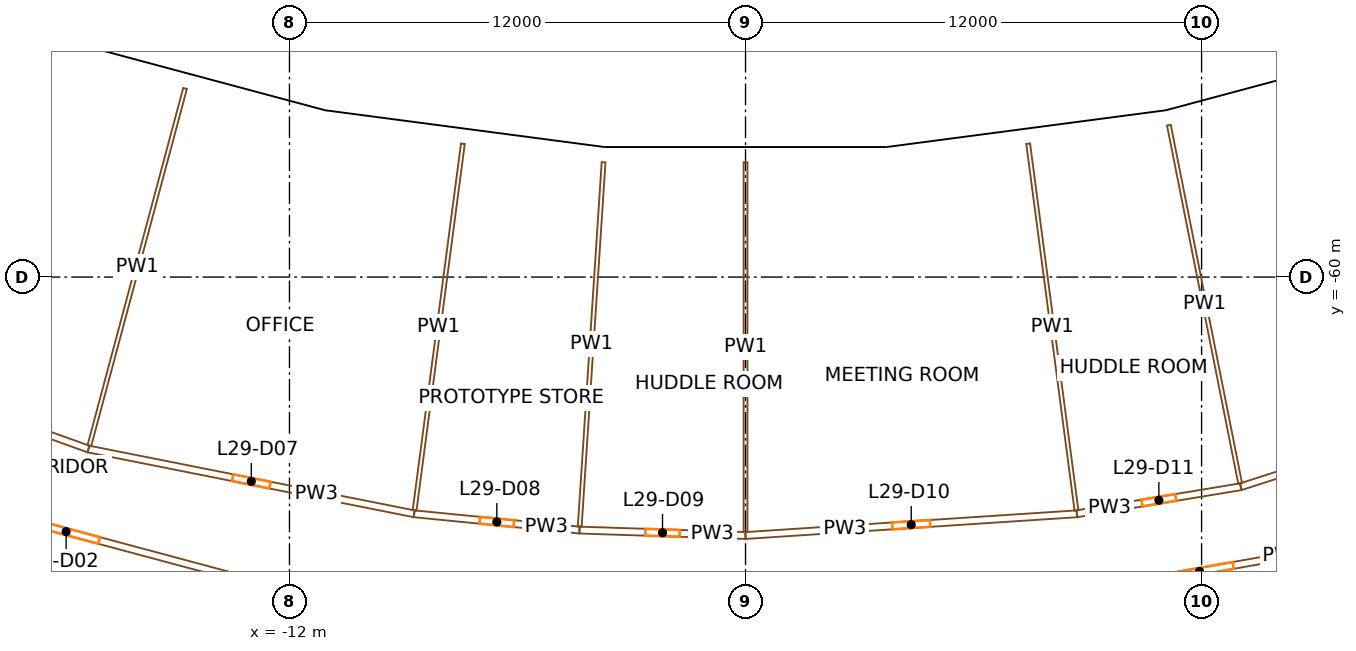
"""IFC4 building model, lengths in metres.
Left out: names, types, materials, properties, quantities, classifications, styles, units other than length and angle.
Written with IfcOpenShell. Run it as: python <this file> out.ifc"""

import sys

from ifc_helpers import new_model, si_unit, direction, frame, frame_2d, origin, origin_2d, place, context, subcontext, project, spatial, rectangle, extrude, element, fill, save


model = new_model("IFC4")
c1 = context("Model", 3, precision=1e-05, world=origin(), true_north=direction((0.0, 1.0)))
c2 = subcontext(c1, "Body", "Model", "MODEL_VIEW")
j1 = project(units=[si_unit("LENGTHUNIT", "METRE"), si_unit("PLANEANGLEUNIT", "RADIAN")], contexts=[c1])
p1 = place(None, origin())
s1 = spatial("IfcSite", under=j1, at=p1, CompositionType="ELEMENT")
p2 = place(p1, origin())
s2 = spatial("IfcBuilding", under=s1, at=p2, CompositionType="ELEMENT")
p3 = place(p2, frame((0.0, 0.0, 129.1)))
s3 = spatial("IfcBuildingStorey", under=s2, at=p3, CompositionType="ELEMENT", Elevation=129.1)
for number, where, z_axis, x_axis in (
    (1, (-18.724, -55.159, 0.0), (0.0, 0.0, 1.0), (0.947, -0.321, 0.0)),
    (2, (-11.364, -57.131, 0.0), (0.0, 0.0, 1.0), (0.981, -0.195, 0.0)),
    (3, (-3.81, -58.125, 0.0), (0.0, 0.0, 1.0), (0.998, -0.065, 0.0)),
    (4, (3.81, -58.125, 0.0), (0.0, 0.0, 1.0), (0.998, 0.065, 0.0)),
    (5, (11.364, -57.131, 0.0), (0.0, 0.0, 1.0), (0.981, 0.195, 0.0)),
):
    element("IfcColumn", number, at=place(p3, frame(where, z_axis=z_axis, x_axis=x_axis)), inside=s3, PredefinedType="COLUMN", context=c2, shape_type="SweptSolid", body=[
        extrude(rectangle(XDim=1.2, YDim=1.5, at=origin_2d()), origin(), (0.0, 0.0, 1.0), 3.8),
    ])
p4 = place(p3, frame((11.125, -55.804, 0.0), z_axis=(0.0, 0.0, 1.0), x_axis=(-0.991444533306, -0.130528684121, 0.0)))
e6 = element("IfcWall", 6, at=p4, inside=s3, PredefinedType="SOLIDWALL", context=c2, shape_type="SweptSolid", body=[
    extrude(rectangle(XDim=7.493, YDim=0.4, at=frame_2d((3.747, 0.0))), origin(), (0.0, 0.0, 1.0), 2.7),
])
p5 = place(p4, frame((4.301, 0.0, 0.9)))
e7 = element("IfcOpeningElement", 7, at=p5, cuts=e6, PredefinedType="OPENING", context=c2, shape_type="SweptSolid", body=[
    extrude(rectangle(XDim=2.6, YDim=1.65, at=frame_2d((1.3, 0.825))), frame((0.0, 0.21, 0.0), z_axis=(0.0, -1.0, 0.0), x_axis=(1.0, 0.0, 0.0)), (0.0, 0.0, 1.0), 0.42),
])
p6 = place(p4, frame((0.592, 0.0, 0.9)))
e8 = element("IfcOpeningElement", 8, at=p6, cuts=e6, PredefinedType="OPENING", context=c2, shape_type="SweptSolid", body=[
    extrude(rectangle(XDim=2.6, YDim=1.65, at=frame_2d((1.3, 0.825))), frame((0.0, 0.21, 0.0), z_axis=(0.0, -1.0, 0.0), x_axis=(1.0, 0.0, 0.0)), (0.0, 0.0, 1.0), 0.42),
])
p7 = place(p3, frame((18.241, -53.894, 0.0), z_axis=(0.0, 0.0, 1.0), x_axis=(-0.965924597867, -0.258823629594, 0.0)))
e9 = element("IfcWall", 9, at=p7, inside=s3, PredefinedType="SOLIDWALL", context=c2, shape_type="SweptSolid", body=[
    extrude(rectangle(XDim=7.342, YDim=0.4, at=frame_2d((3.671, 0.0))), origin(), (0.0, 0.0, 1.0), 2.7),
])
p8 = place(p7, frame((4.225, 0.0, 0.9)))
e10 = element("IfcOpeningElement", 10, at=p8, cuts=e9, PredefinedType="OPENING", context=c2, shape_type="SweptSolid", body=[
    extrude(rectangle(XDim=2.6, YDim=1.65, at=frame_2d((1.3, 0.825))), frame((0.0, 0.21, 0.0), z_axis=(0.0, -1.0, 0.0), x_axis=(1.0, 0.0, 0.0)), (0.0, 0.0, 1.0), 0.42),
])
p9 = place(p7, frame((0.517, 0.0, 0.9)))
e11 = element("IfcOpeningElement", 11, at=p9, cuts=e9, PredefinedType="OPENING", context=c2, shape_type="SweptSolid", body=[
    extrude(rectangle(XDim=2.6, YDim=1.65, at=frame_2d((1.3, 0.825))), frame((0.0, 0.21, 0.0), z_axis=(0.0, -1.0, 0.0), x_axis=(1.0, 0.0, 0.0)), (0.0, 0.0, 1.0), 0.42),
])
p10 = place(p3, frame((-11.15, -55.794, 0.0), z_axis=(0.0, 0.0, 1.0), x_axis=(-0.965924597867, 0.258823629594, 0.0)))
e12 = element("IfcWall", 12, at=p10, inside=s3, PredefinedType="SOLIDWALL", context=c2, shape_type="SweptSolid", body=[
    extrude(rectangle(XDim=7.342, YDim=0.4, at=frame_2d((3.671, 0.0))), origin(), (0.0, 0.0, 1.0), 2.7),
])
p11 = place(p10, frame((4.225, 0.0, 0.9)))
e13 = element("IfcOpeningElement", 13, at=p11, cuts=e12, PredefinedType="OPENING", context=c2, shape_type="SweptSolid", body=[
    extrude(rectangle(XDim=2.6, YDim=1.65, at=frame_2d((1.3, 0.825))), frame((0.0, 0.21, 0.0), z_axis=(0.0, -1.0, 0.0), x_axis=(1.0, 0.0, 0.0)), (0.0, 0.0, 1.0), 0.42),
])
p12 = place(p10, frame((0.517, 0.0, 0.9)))
e14 = element("IfcOpeningElement", 14, at=p12, cuts=e12, PredefinedType="OPENING", context=c2, shape_type="SweptSolid", body=[
    extrude(rectangle(XDim=2.6, YDim=1.65, at=frame_2d((1.3, 0.825))), frame((0.0, 0.21, 0.0), z_axis=(0.0, -1.0, 0.0), x_axis=(1.0, 0.0, 0.0)), (0.0, 0.0, 1.0), 0.42),
])
p13 = place(p3, frame((-3.697, -56.782, 0.0), z_axis=(0.0, 0.0, 1.0), x_axis=(-0.991444533306, 0.130528684121, 0.0)))
e15 = element("IfcWall", 15, at=p13, inside=s3, PredefinedType="SOLIDWALL", context=c2, shape_type="SweptSolid", body=[
    extrude(rectangle(XDim=7.493, YDim=0.4, at=frame_2d((3.747, 0.0))), origin(), (0.0, 0.0, 1.0), 2.7),
])
p14 = place(p13, frame((4.301, 0.0, 0.9)))
e16 = element("IfcOpeningElement", 16, at=p14, cuts=e15, PredefinedType="OPENING", context=c2, shape_type="SweptSolid", body=[
    extrude(rectangle(XDim=2.6, YDim=1.65, at=frame_2d((1.3, 0.825))), frame((0.0, 0.21, 0.0), z_axis=(0.0, -1.0, 0.0), x_axis=(1.0, 0.0, 0.0)), (0.0, 0.0, 1.0), 0.42),
])
p15 = place(p13, frame((0.592, 0.0, 0.9)))
e17 = element("IfcOpeningElement", 17, at=p15, cuts=e15, PredefinedType="OPENING", context=c2, shape_type="SweptSolid", body=[
    extrude(rectangle(XDim=2.6, YDim=1.65, at=frame_2d((1.3, 0.825))), frame((0.0, 0.21, 0.0), z_axis=(0.0, -1.0, 0.0), x_axis=(1.0, 0.0, 0.0)), (0.0, 0.0, 1.0), 0.42),
])
p16 = place(p3, frame((3.671, -56.779, 0.0), z_axis=(0.0, 0.0, 1.0), x_axis=(-1.0, 0.0, 0.0)))
e18 = element("IfcWall", 18, at=p16, inside=s3, PredefinedType="SOLIDWALL", context=c2, shape_type="SweptSolid", body=[
    extrude(rectangle(XDim=7.341, YDim=0.4, at=frame_2d((3.671, 0.0))), origin(), (0.0, 0.0, 1.0), 2.7),
])
p17 = place(p16, frame((4.225, 0.0, 0.9)))
e19 = element("IfcOpeningElement", 19, at=p17, cuts=e18, PredefinedType="OPENING", context=c2, shape_type="SweptSolid", body=[
    extrude(rectangle(XDim=2.6, YDim=1.65, at=frame_2d((1.3, 0.825))), frame((0.0, 0.21, 0.0), z_axis=(0.0, -1.0, 0.0), x_axis=(1.0, 0.0, 0.0)), (0.0, 0.0, 1.0), 0.42),
])
p18 = place(p16, frame((0.517, 0.0, 0.9)))
e20 = element("IfcOpeningElement", 20, at=p18, cuts=e18, PredefinedType="OPENING", context=c2, shape_type="SweptSolid", body=[
    extrude(rectangle(XDim=2.6, YDim=1.65, at=frame_2d((1.3, 0.825))), frame((0.0, 0.21, 0.0), z_axis=(0.0, -1.0, 0.0), x_axis=(1.0, 0.0, 0.0)), (0.0, 0.0, 1.0), 0.42),
])
p19 = place(p3, frame((-27.64, -60.807, 0.0), z_axis=(0.0, 0.0, 1.0), x_axis=(0.941150861554, -0.337986768669, 0.0)))
e21 = element("IfcWall", 21, at=p19, inside=s3, PredefinedType="PARTITIONING", context=c2, shape_type="SweptSolid", body=[
    extrude(rectangle(XDim=10.998, YDim=0.18, at=frame_2d((5.499, 0.0))), origin(), (0.0, 0.0, 1.0), 2.4),
])
p20 = place(p19, frame((4.999, 0.0, 0.0)))
e22 = element("IfcOpeningElement", 22, at=p20, cuts=e21, PredefinedType="OPENING", context=c2, shape_type="SweptSolid", body=[
    extrude(rectangle(XDim=1.0, YDim=2.1, at=frame_2d((0.5, 1.05))), frame((0.0, 0.1, 0.0), z_axis=(0.0, -1.0, 0.0), x_axis=(1.0, 0.0, 0.0)), (0.0, 0.0, 1.0), 0.2),
])
p21 = place(p3, frame((-13.509, -67.868, 0.0), z_axis=(0.0, 0.0, 1.0), x_axis=(-0.965930457668, 0.258801759942, 0.0)))
e23 = element("IfcWall", 23, at=p21, inside=s3, PredefinedType="PARTITIONING", context=c2, shape_type="SweptSolid", body=[
    extrude(rectangle(XDim=9.043, YDim=0.18, at=frame_2d((4.521, 0.0))), origin(), (0.0, 0.0, 1.0), 2.4),
])
p22 = place(p21, frame((3.621, 0.0, 0.0)))
e24 = element("IfcOpeningElement", 24, at=p22, cuts=e23, PredefinedType="OPENING", context=c2, shape_type="SweptSolid", body=[
    extrude(rectangle(XDim=1.8, YDim=2.1, at=frame_2d((0.9, 1.05))), frame((0.0, 0.1, 0.0), z_axis=(0.0, -1.0, 0.0), x_axis=(1.0, 0.0, 0.0)), (0.0, 0.0, 1.0), 0.2),
])
p23 = place(p3, frame((-17.289, -64.524, 0.0), z_axis=(0.0, 0.0, 1.0), x_axis=(0.980786466832, -0.195084357342, 0.0)))
e25 = element("IfcWall", 25, at=p23, inside=s3, PredefinedType="PARTITIONING", context=c2, shape_type="SweptSolid", body=[
    extrude(rectangle(XDim=8.738, YDim=0.18, at=frame_2d((4.369, 0.0))), origin(), (0.0, 0.0, 1.0), 2.4),
])
p24 = place(p23, frame((3.869, 0.0, 0.0)))
e26 = element("IfcOpeningElement", 26, at=p24, cuts=e25, PredefinedType="OPENING", context=c2, shape_type="SweptSolid", body=[
    extrude(rectangle(XDim=1.0, YDim=2.1, at=frame_2d((0.5, 1.05))), frame((0.0, 0.1, 0.0), z_axis=(0.0, -1.0, 0.0), x_axis=(1.0, 0.0, 0.0)), (0.0, 0.0, 1.0), 0.2),
])
p25 = place(p3, frame((-14.747, -55.037, 0.0), z_axis=(0.0, 0.0, 1.0), x_axis=(-0.258828880572, -0.965923190829, 0.0)))
e27 = element("IfcWall", 27, at=p25, inside=s3, PredefinedType="PARTITIONING", context=c2, shape_type="SweptSolid", body=[
    extrude(rectangle(XDim=9.731, YDim=0.1, at=frame_2d((4.866, 0.0))), origin(), (0.0, 0.0, 1.0), 2.4),
])
p26 = place(p3, frame((-8.719, -66.229, 0.0), z_axis=(0.0, 0.0, 1.0), x_axis=(0.995184826457, -0.098016127192, 0.0)))
e28 = element("IfcWall", 28, at=p26, inside=s3, PredefinedType="PARTITIONING", context=c2, shape_type="SweptSolid", body=[
    extrude(rectangle(XDim=4.371, YDim=0.18, at=frame_2d((2.186, 0.0))), origin(), (0.0, 0.0, 1.0), 2.4),
])
p27 = place(p26, frame((1.736, 0.0, 0.0)))
e29 = element("IfcOpeningElement", 29, at=p27, cuts=e28, PredefinedType="OPENING", context=c2, shape_type="SweptSolid", body=[
    extrude(rectangle(XDim=0.9, YDim=2.1, at=frame_2d((0.45, 1.05))), frame((0.0, 0.1, 0.0), z_axis=(0.0, -1.0, 0.0), x_axis=(1.0, 0.0, 0.0)), (0.0, 0.0, 1.0), 0.2),
])
p28 = place(p3, frame((-7.437, -56.491, 0.0), z_axis=(0.0, 0.0, 1.0), x_axis=(-0.130531739513, -0.991444131043, 0.0)))
e30 = element("IfcWall", 30, at=p28, inside=s3, PredefinedType="PARTITIONING", context=c2, shape_type="SweptSolid", body=[
    extrude(rectangle(XDim=9.731, YDim=0.1, at=frame_2d((4.866, 0.0))), origin(), (0.0, 0.0, 1.0), 2.4),
])
p29 = place(p3, frame((-4.369, -66.657, 0.0), z_axis=(0.0, 0.0, 1.0), x_axis=(0.99946426167, -0.03272903366, 0.0)))
e31 = element("IfcWall", 31, at=p29, inside=s3, PredefinedType="PARTITIONING", context=c2, shape_type="SweptSolid", body=[
    extrude(rectangle(XDim=4.371, YDim=0.18, at=frame_2d((2.186, 0.0))), origin(), (0.0, 0.0, 1.0), 2.4),
])
p30 = place(p29, frame((1.736, 0.0, 0.0)))
e32 = element("IfcOpeningElement", 32, at=p30, cuts=e31, PredefinedType="OPENING", context=c2, shape_type="SweptSolid", body=[
    extrude(rectangle(XDim=0.9, YDim=2.1, at=frame_2d((0.45, 1.05))), frame((0.0, 0.1, 0.0), z_axis=(0.0, -1.0, 0.0), x_axis=(1.0, 0.0, 0.0)), (0.0, 0.0, 1.0), 0.2),
])
p31 = place(p3, frame((-3.735, -56.978, 0.0), z_axis=(0.0, 0.0, 1.0), x_axis=(-0.065392602582, -0.997859613136, 0.0)))
e33 = element("IfcWall", 33, at=p31, inside=s3, PredefinedType="PARTITIONING", context=c2, shape_type="SweptSolid", body=[
    extrude(rectangle(XDim=9.61, YDim=0.1, at=frame_2d((4.805, 0.0))), origin(), (0.0, 0.0, 1.0), 2.4),
])
p32 = place(p3, frame((0.0, -66.8, 0.0), z_axis=(0.0, 0.0, 1.0), x_axis=(0.997858593599, 0.065408158359, 0.0)))
e34 = element("IfcWall", 34, at=p32, inside=s3, PredefinedType="PARTITIONING", context=c2, shape_type="SweptSolid", body=[
    extrude(rectangle(XDim=8.738, YDim=0.18, at=frame_2d((4.369, 0.0))), origin(), (0.0, 0.0, 1.0), 2.4),
])
p33 = place(p32, frame((3.869, 0.0, 0.0)))
e35 = element("IfcOpeningElement", 35, at=p33, cuts=e34, PredefinedType="OPENING", context=c2, shape_type="SweptSolid", body=[
    extrude(rectangle(XDim=1.0, YDim=2.1, at=frame_2d((0.5, 1.05))), frame((0.0, 0.1, 0.0), z_axis=(0.0, -1.0, 0.0), x_axis=(1.0, 0.0, 0.0)), (0.0, 0.0, 1.0), 0.2),
])
p34 = place(p3, frame((0.0, -56.979, 0.0), z_axis=(0.0, 0.0, 1.0), x_axis=(0.0, -1.0, 0.0)))
e36 = element("IfcWall", 36, at=p34, inside=s3, PredefinedType="PARTITIONING", context=c2, shape_type="SweptSolid", body=[
    extrude(rectangle(XDim=9.731, YDim=0.1, at=frame_2d((4.866, 0.0))), origin(), (0.0, 0.0, 1.0), 2.4),
])
p35 = place(p3, frame((19.366, -66.435, 0.0), z_axis=(0.0, 0.0, 1.0), x_axis=(-0.984805080703, -0.173663332402, 0.0)))
e37 = element("IfcWall", 37, at=p35, inside=s3, PredefinedType="PARTITIONING", context=c2, shape_type="SweptSolid", body=[
    extrude(rectangle(XDim=15.069, YDim=0.18, at=frame_2d((7.535, 0.0))), origin(), (0.0, 0.0, 1.0), 2.4),
])
p36 = place(p35, frame((6.635, 0.0, 0.0)))
e38 = element("IfcOpeningElement", 38, at=p36, cuts=e37, PredefinedType="OPENING", context=c2, shape_type="SweptSolid", body=[
    extrude(rectangle(XDim=1.8, YDim=2.1, at=frame_2d((0.9, 1.05))), frame((0.0, 0.1, 0.0), z_axis=(0.0, -1.0, 0.0), x_axis=(1.0, 0.0, 0.0)), (0.0, 0.0, 1.0), 0.2),
])
p37 = place(p3, frame((7.437, -56.491, 0.0), z_axis=(0.0, 0.0, 1.0), x_axis=(0.130531739513, -0.991444131043, 0.0)))
e39 = element("IfcWall", 39, at=p37, inside=s3, PredefinedType="PARTITIONING", context=c2, shape_type="SweptSolid", body=[
    extrude(rectangle(XDim=9.731, YDim=0.1, at=frame_2d((4.866, 0.0))), origin(), (0.0, 0.0, 1.0), 2.4),
])
p38 = place(p3, frame((8.719, -66.229, 0.0), z_axis=(0.0, 0.0, 1.0), x_axis=(0.986638873051, 0.162922479065, 0.0)))
e40 = element("IfcWall", 40, at=p38, inside=s3, PredefinedType="PARTITIONING", context=c2, shape_type="SweptSolid", body=[
    extrude(rectangle(XDim=4.371, YDim=0.18, at=frame_2d((2.186, 0.0))), origin(), (0.0, 0.0, 1.0), 2.4),
])
p39 = place(p38, frame((1.736, 0.0, 0.0)))
e41 = element("IfcOpeningElement", 41, at=p39, cuts=e40, PredefinedType="OPENING", context=c2, shape_type="SweptSolid", body=[
    extrude(rectangle(XDim=0.9, YDim=2.1, at=frame_2d((0.45, 1.05))), frame((0.0, 0.1, 0.0), z_axis=(0.0, -1.0, 0.0), x_axis=(1.0, 0.0, 0.0)), (0.0, 0.0, 1.0), 0.2),
])
p40 = place(p3, frame((11.14, -56.003, 0.0), z_axis=(0.0, 0.0, 1.0), x_axis=(0.195085169116, -0.980786305365, 0.0)))
e42 = element("IfcWall", 42, at=p40, inside=s3, PredefinedType="PARTITIONING", context=c2, shape_type="SweptSolid", body=[
    extrude(rectangle(XDim=9.61, YDim=0.1, at=frame_2d((4.805, 0.0))), origin(), (0.0, 0.0, 1.0), 2.4),
])
p41 = place(p3, frame((13.032, -65.516, 0.0), z_axis=(0.0, 0.0, 1.0), x_axis=(0.951705469381, 0.307012539729, 0.0)))
e43 = element("IfcWall", 43, at=p41, inside=s3, PredefinedType="PARTITIONING", context=c2, shape_type="SweptSolid", body=[
    extrude(rectangle(XDim=15.348, YDim=0.18, at=frame_2d((7.674, 0.0))), origin(), (0.0, 0.0, 1.0), 2.4),
])
p42 = place(p41, frame((6.774, 0.0, 0.0)))
e44 = element("IfcOpeningElement", 44, at=p42, cuts=e43, PredefinedType="OPENING", context=c2, shape_type="SweptSolid", body=[
    extrude(rectangle(XDim=1.8, YDim=2.1, at=frame_2d((0.9, 1.05))), frame((0.0, 0.1, 0.0), z_axis=(0.0, -1.0, 0.0), x_axis=(1.0, 0.0, 0.0)), (0.0, 0.0, 1.0), 0.2),
])
p43 = place(p11, origin())
e45 = element("IfcWindow", 45, at=p43, inside=s3, PartitioningType="SINGLE_PANEL", PredefinedType="WINDOW", context=c2, shape_type="SweptSolid", body=[
    extrude(rectangle(XDim=2.6, YDim=1.65, at=frame_2d((1.3, 0.825))), frame((0.0, 0.03, 0.0), z_axis=(0.0, -1.0, 0.0), x_axis=(1.0, 0.0, 0.0)), (0.0, 0.0, 1.0), 0.06),
])
fill(e13, e45)
p44 = place(p12, origin())
e46 = element("IfcWindow", 46, at=p44, inside=s3, PartitioningType="SINGLE_PANEL", PredefinedType="WINDOW", context=c2, shape_type="SweptSolid", body=[
    extrude(rectangle(XDim=2.6, YDim=1.65, at=frame_2d((1.3, 0.825))), frame((0.0, 0.03, 0.0), z_axis=(0.0, -1.0, 0.0), x_axis=(1.0, 0.0, 0.0)), (0.0, 0.0, 1.0), 0.06),
])
fill(e14, e46)
p45 = place(p14, origin())
e47 = element("IfcWindow", 47, at=p45, inside=s3, PartitioningType="SINGLE_PANEL", PredefinedType="WINDOW", context=c2, shape_type="SweptSolid", body=[
    extrude(rectangle(XDim=2.6, YDim=1.65, at=frame_2d((1.3, 0.825))), frame((0.0, 0.03, 0.0), z_axis=(0.0, -1.0, 0.0), x_axis=(1.0, 0.0, 0.0)), (0.0, 0.0, 1.0), 0.06),
])
fill(e16, e47)
p46 = place(p15, origin())
e48 = element("IfcWindow", 48, at=p46, inside=s3, PartitioningType="SINGLE_PANEL", PredefinedType="WINDOW", context=c2, shape_type="SweptSolid", body=[
    extrude(rectangle(XDim=2.6, YDim=1.65, at=frame_2d((1.3, 0.825))), frame((0.0, 0.03, 0.0), z_axis=(0.0, -1.0, 0.0), x_axis=(1.0, 0.0, 0.0)), (0.0, 0.0, 1.0), 0.06),
])
fill(e17, e48)
p47 = place(p17, origin())
e49 = element("IfcWindow", 49, at=p47, inside=s3, PartitioningType="SINGLE_PANEL", PredefinedType="WINDOW", context=c2, shape_type="SweptSolid", body=[
    extrude(rectangle(XDim=2.6, YDim=1.65, at=frame_2d((1.3, 0.825))), frame((0.0, 0.03, 0.0), z_axis=(0.0, -1.0, 0.0), x_axis=(1.0, 0.0, 0.0)), (0.0, 0.0, 1.0), 0.06),
])
fill(e19, e49)
p48 = place(p18, origin())
e50 = element("IfcWindow", 50, at=p48, inside=s3, PartitioningType="SINGLE_PANEL", PredefinedType="WINDOW", context=c2, shape_type="SweptSolid", body=[
    extrude(rectangle(XDim=2.6, YDim=1.65, at=frame_2d((1.3, 0.825))), frame((0.0, 0.03, 0.0), z_axis=(0.0, -1.0, 0.0), x_axis=(1.0, 0.0, 0.0)), (0.0, 0.0, 1.0), 0.06),
])
fill(e20, e50)
p49 = place(p5, origin())
e51 = element("IfcWindow", 51, at=p49, inside=s3, PartitioningType="SINGLE_PANEL", PredefinedType="WINDOW", context=c2, shape_type="SweptSolid", body=[
    extrude(rectangle(XDim=2.6, YDim=1.65, at=frame_2d((1.3, 0.825))), frame((0.0, 0.03, 0.0), z_axis=(0.0, -1.0, 0.0), x_axis=(1.0, 0.0, 0.0)), (0.0, 0.0, 1.0), 0.06),
])
fill(e7, e51)
p50 = place(p6, origin())
e52 = element("IfcWindow", 52, at=p50, inside=s3, PartitioningType="SINGLE_PANEL", PredefinedType="WINDOW", context=c2, shape_type="SweptSolid", body=[
    extrude(rectangle(XDim=2.6, YDim=1.65, at=frame_2d((1.3, 0.825))), frame((0.0, 0.03, 0.0), z_axis=(0.0, -1.0, 0.0), x_axis=(1.0, 0.0, 0.0)), (0.0, 0.0, 1.0), 0.06),
])
fill(e8, e52)
p51 = place(p8, origin())
e53 = element("IfcWindow", 53, at=p51, inside=s3, PartitioningType="SINGLE_PANEL", PredefinedType="WINDOW", context=c2, shape_type="SweptSolid", body=[
    extrude(rectangle(XDim=2.6, YDim=1.65, at=frame_2d((1.3, 0.825))), frame((0.0, 0.03, 0.0), z_axis=(0.0, -1.0, 0.0), x_axis=(1.0, 0.0, 0.0)), (0.0, 0.0, 1.0), 0.06),
])
fill(e10, e53)
p52 = place(p22, origin())
e54 = element("IfcDoor", 54, at=p52, inside=s3, OperationType="DOUBLE_DOOR_SINGLE_SWING", PredefinedType="DOOR", context=c2, shape_type="SweptSolid", body=[
    extrude(rectangle(XDim=1.8, YDim=2.1, at=frame_2d((0.9, 1.05))), frame((0.0, 0.025, 0.0), z_axis=(0.0, -1.0, 0.0), x_axis=(1.0, 0.0, 0.0)), (0.0, 0.0, 1.0), 0.05),
])
fill(e24, e54)
p53 = place(p36, origin())
e55 = element("IfcDoor", 55, at=p53, inside=s3, OperationType="DOUBLE_DOOR_SINGLE_SWING", PredefinedType="DOOR", context=c2, shape_type="SweptSolid", body=[
    extrude(rectangle(XDim=1.8, YDim=2.1, at=frame_2d((0.9, 1.05))), frame((0.0, 0.025, 0.0), z_axis=(0.0, -1.0, 0.0), x_axis=(1.0, 0.0, 0.0)), (0.0, 0.0, 1.0), 0.05),
])
fill(e38, e55)
p54 = place(p24, origin())
e56 = element("IfcDoor", 56, at=p54, inside=s3, OperationType="SINGLE_SWING_RIGHT", PredefinedType="DOOR", context=c2, shape_type="SweptSolid", body=[
    extrude(rectangle(XDim=1.0, YDim=2.1, at=frame_2d((0.5, 1.05))), frame((0.0, 0.025, 0.0), z_axis=(0.0, -1.0, 0.0), x_axis=(1.0, 0.0, 0.0)), (0.0, 0.0, 1.0), 0.05),
])
fill(e26, e56)
p55 = place(p27, origin())
e57 = element("IfcDoor", 57, at=p55, inside=s3, OperationType="SINGLE_SWING_RIGHT", PredefinedType="DOOR", context=c2, shape_type="SweptSolid", body=[
    extrude(rectangle(XDim=0.9, YDim=2.1, at=frame_2d((0.45, 1.05))), frame((0.0, 0.025, 0.0), z_axis=(0.0, -1.0, 0.0), x_axis=(1.0, 0.0, 0.0)), (0.0, 0.0, 1.0), 0.05),
])
fill(e29, e57)
p56 = place(p30, origin())
e58 = element("IfcDoor", 58, at=p56, inside=s3, OperationType="SINGLE_SWING_RIGHT", PredefinedType="DOOR", context=c2, shape_type="SweptSolid", body=[
    extrude(rectangle(XDim=0.9, YDim=2.1, at=frame_2d((0.45, 1.05))), frame((0.0, 0.025, 0.0), z_axis=(0.0, -1.0, 0.0), x_axis=(1.0, 0.0, 0.0)), (0.0, 0.0, 1.0), 0.05),
])
fill(e32, e58)
p57 = place(p33, origin())
e59 = element("IfcDoor", 59, at=p57, inside=s3, OperationType="SINGLE_SWING_RIGHT", PredefinedType="DOOR", context=c2, shape_type="SweptSolid", body=[
    extrude(rectangle(XDim=1.0, YDim=2.1, at=frame_2d((0.5, 1.05))), frame((0.0, 0.025, 0.0), z_axis=(0.0, -1.0, 0.0), x_axis=(1.0, 0.0, 0.0)), (0.0, 0.0, 1.0), 0.05),
])
fill(e35, e59)
p58 = place(p39, origin())
e60 = element("IfcDoor", 60, at=p58, inside=s3, OperationType="SINGLE_SWING_RIGHT", PredefinedType="DOOR", context=c2, shape_type="SweptSolid", body=[
    extrude(rectangle(XDim=0.9, YDim=2.1, at=frame_2d((0.45, 1.05))), frame((0.0, 0.025, 0.0), z_axis=(0.0, -1.0, 0.0), x_axis=(1.0, 0.0, 0.0)), (0.0, 0.0, 1.0), 0.05),
])
fill(e41, e60)
save(model, sys.argv[1])
